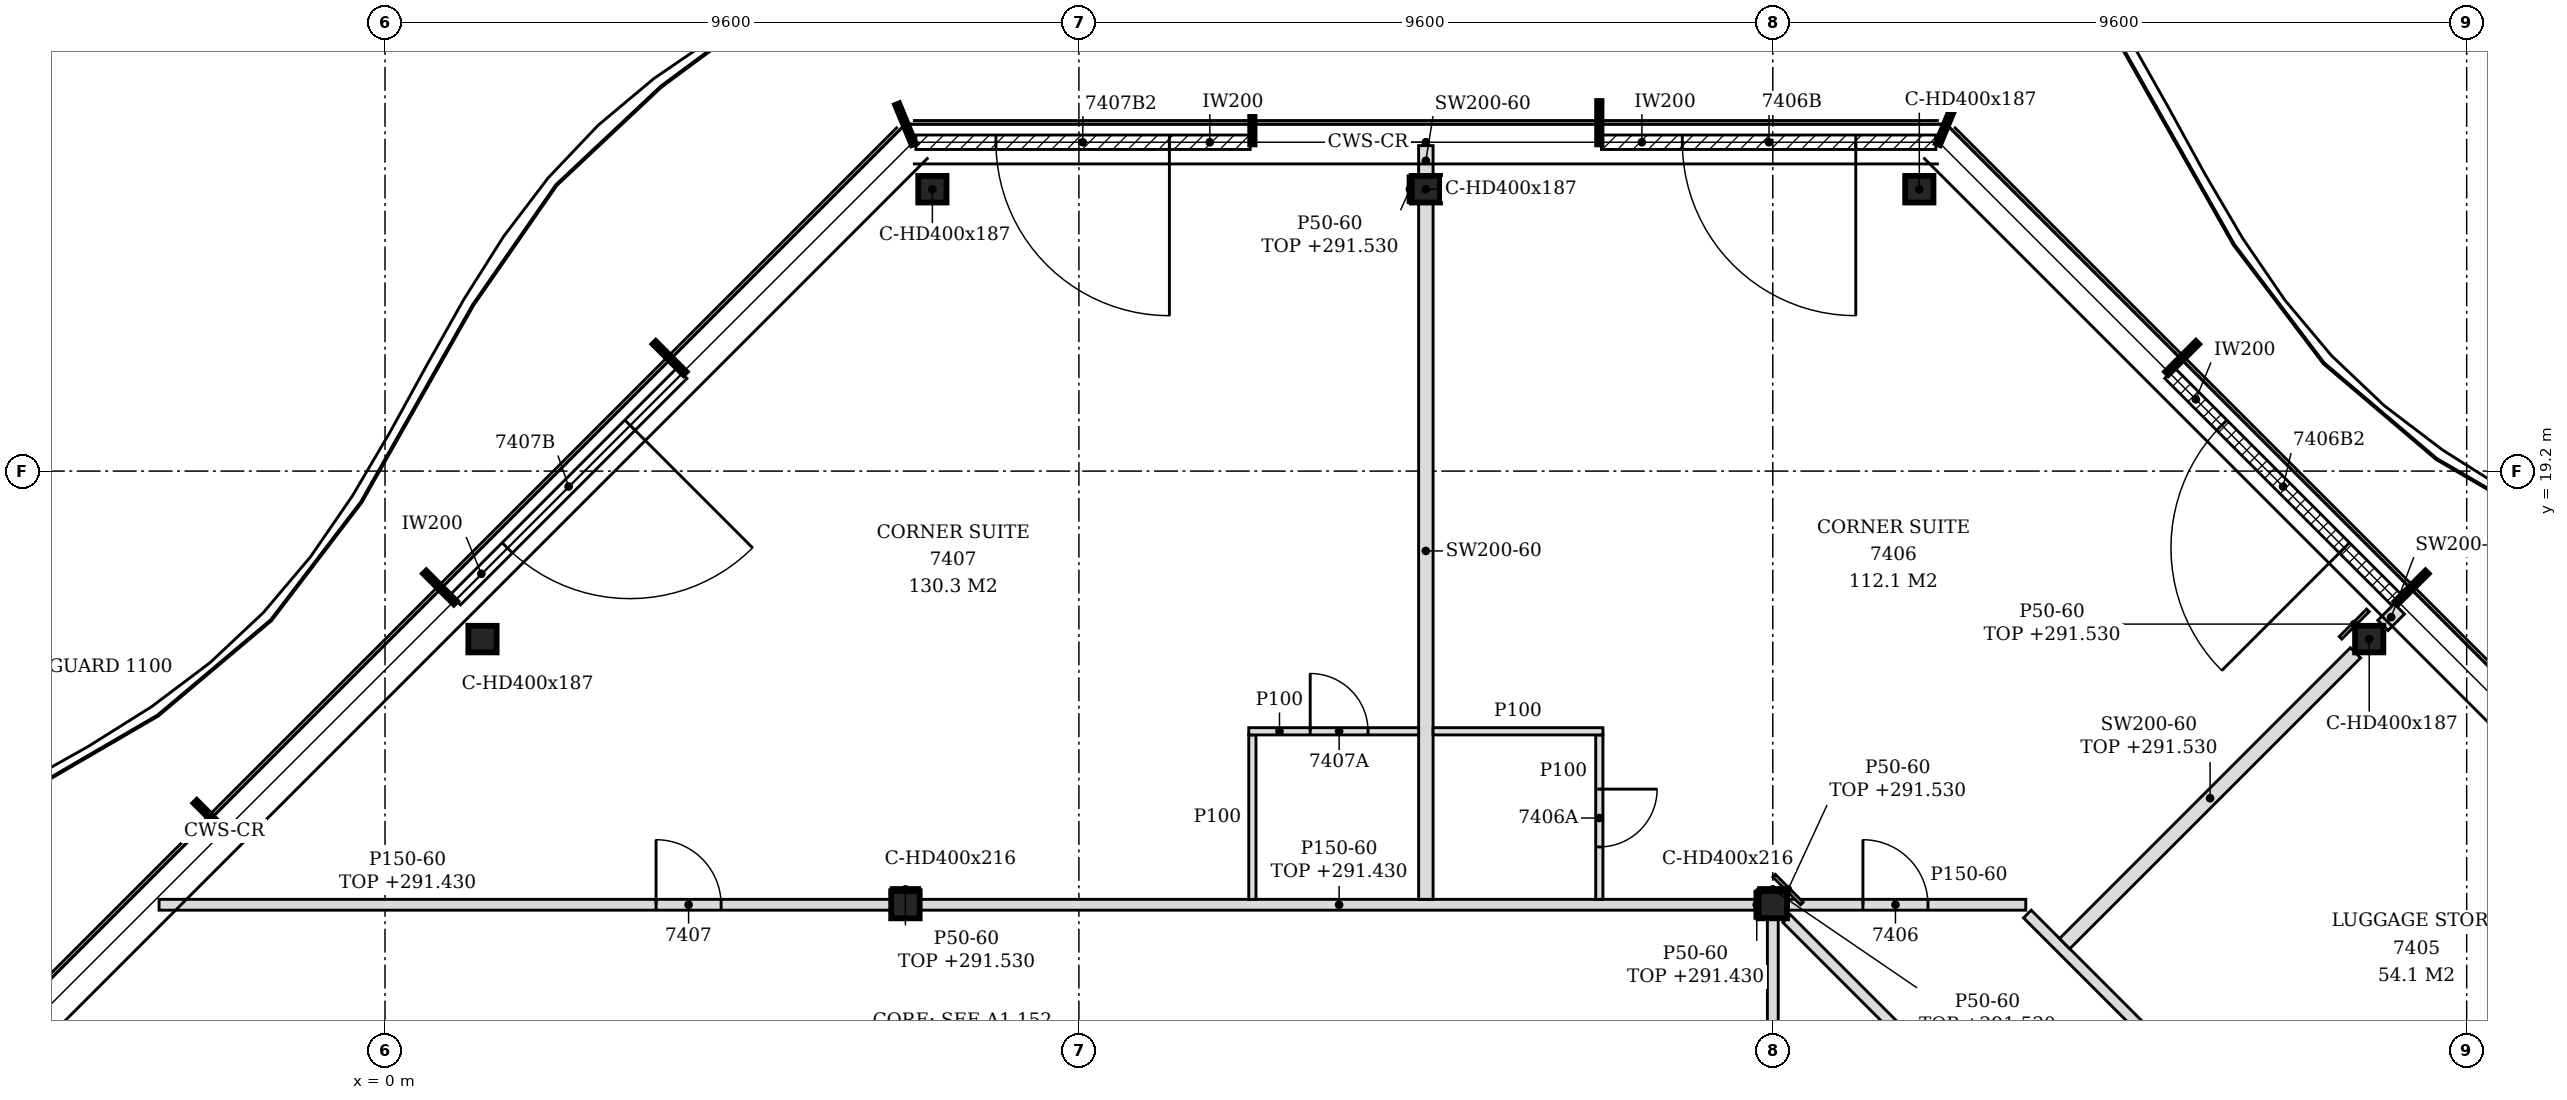
"""IFC4 building model, lengths in metres.
Left out: names, types, materials, properties, quantities, classifications, styles, units other than length and angle.
Written with IfcOpenShell. Run it as: python <this file> out.ifc"""

import sys

from ifc_helpers import new_model, si_unit, direction, frame, frame_2d, origin, origin_2d, place, context, subcontext, project, spatial, polyline, rectangle, i_section, outline, extrude, element, fill, save


model = new_model("IFC4")
c1 = context("Model", 3, precision=1e-05, world=origin(), true_north=direction((0.0, 1.0)))
c2 = subcontext(c1, "Body", "Model", "MODEL_VIEW")
j1 = project(units=[si_unit("LENGTHUNIT", "METRE"), si_unit("PLANEANGLEUNIT", "RADIAN")], contexts=[c1])
p1 = place(None, origin())
s1 = spatial("IfcSite", under=j1, at=p1, CompositionType="ELEMENT")
p2 = place(p1, origin())
s2 = spatial("IfcBuilding", under=s1, at=p2, CompositionType="ELEMENT")
p3 = place(p2, frame((0.0, 0.0, 288.6)))
s3 = spatial("IfcBuildingStorey", under=s2, at=p3, CompositionType="ELEMENT", Elevation=288.6)
for number, where, z_axis, x_axis in (
    (1, (27.451, 16.876, -0.15), (0.0, 0.0, 1.0), (1.0, 0.0, 0.0)),
    (2, (21.227, 23.1, -0.15), (0.0, 0.0, 1.0), (1.0, 0.0, 0.0)),
    (3, (14.4, 23.1, -0.15), (0.0, 0.0, 1.0), (1.0, 0.0, 0.0)),
    (4, (7.573, 23.1, -0.15), (0.0, 0.0, 1.0), (1.0, 0.0, 0.0)),
    (5, (1.348, 16.876, -0.15), (0.0, 0.0, 1.0), (1.0, 0.0, 0.0)),
):
    element("IfcColumn", number, at=place(p3, frame(where, z_axis=z_axis, x_axis=x_axis)), inside=s3, PredefinedType="COLUMN", context=c2, shape_type="SweptSolid", body=[
        extrude(i_section(OverallWidth=0.391, OverallDepth=0.368, WebThickness=0.015, FlangeThickness=0.024, FilletRadius=0.015, at=origin_2d()), origin(), (0.0, 0.0, 1.0), 3.6),
    ])
for number, where, z_axis, x_axis in (
    (6, (7.2, 13.2, -0.15), (0.0, 0.0, 1.0), (1.0, 0.0, 0.0)),
    (7, (19.2, 13.2, -0.15), (0.0, 0.0, 1.0), (1.0, 0.0, 0.0)),
):
    element("IfcColumn", number, at=place(p3, frame(where, z_axis=z_axis, x_axis=x_axis)), inside=s3, PredefinedType="COLUMN", context=c2, shape_type="SweptSolid", body=[
        extrude(i_section(OverallWidth=0.394, OverallDepth=0.375, WebThickness=0.017, FlangeThickness=0.028, FilletRadius=0.015, at=origin_2d()), origin(), (0.0, 0.0, 1.0), 3.6),
    ])
p4 = place(p3, frame((27.826, 17.42, 0.0), z_axis=(0.0, 0.0, 1.0), x_axis=(-0.707079231393, 0.707134329907, 0.0)))
e8 = element("IfcWall", 8, at=p4, inside=s3, PredefinedType="NOTDEFINED", context=c2, shape_type="SweptSolid", body=[
    extrude(rectangle(XDim=4.431, YDim=0.2, at=frame_2d((2.215, 0.0))), origin(), (0.0, 0.0, 1.0), 3.45),
])
p5 = place(p4, frame((1.015, 0.0, 0.0)))
e9 = element("IfcOpeningElement", 9, at=p5, cuts=e8, PredefinedType="OPENING", context=c2, shape_type="SweptSolid", body=[
    extrude(rectangle(XDim=2.4, YDim=2.4, at=frame_2d((1.2, 1.2))), frame((0.0, 0.11, 0.0), z_axis=(0.0, -1.0, 0.0), x_axis=(1.0, 0.0, 0.0)), (0.0, 0.0, 1.0), 0.22),
])
p6 = place(p3, frame((21.457, 23.75, 0.0), z_axis=(0.0, 0.0, 1.0), x_axis=(-1.0, 0.0, 0.0)))
e10 = element("IfcWall", 10, at=p6, inside=s3, PredefinedType="NOTDEFINED", context=c2, shape_type="SweptSolid", body=[
    extrude(rectangle(XDim=4.626, YDim=0.2, at=frame_2d((2.313, 0.0))), origin(), (0.0, 0.0, 1.0), 3.45),
])
p7 = place(p6, frame((1.108, 0.0, 0.0)))
e11 = element("IfcOpeningElement", 11, at=p7, cuts=e10, PredefinedType="OPENING", context=c2, shape_type="SweptSolid", body=[
    extrude(rectangle(XDim=2.4, YDim=2.4, at=frame_2d((1.2, 1.2))), frame((0.0, 0.11, 0.0), z_axis=(0.0, -1.0, 0.0), x_axis=(1.0, 0.0, 0.0)), (0.0, 0.0, 1.0), 0.22),
])
p8 = place(p3, frame((11.97, 23.75, 0.0), z_axis=(0.0, 0.0, 1.0), x_axis=(-1.0, 0.0, 0.0)))
e12 = element("IfcWall", 12, at=p8, inside=s3, PredefinedType="NOTDEFINED", context=c2, shape_type="SweptSolid", body=[
    extrude(rectangle(XDim=4.626, YDim=0.2, at=frame_2d((2.313, 0.0))), origin(), (0.0, 0.0, 1.0), 3.45),
])
p9 = place(p8, frame((1.118, 0.0, 0.0)))
e13 = element("IfcOpeningElement", 13, at=p9, cuts=e12, PredefinedType="OPENING", context=c2, shape_type="SweptSolid", body=[
    extrude(rectangle(XDim=2.4, YDim=2.4, at=frame_2d((1.2, 1.2))), frame((0.0, 0.11, 0.0), z_axis=(0.0, -1.0, 0.0), x_axis=(1.0, 0.0, 0.0)), (0.0, 0.0, 1.0), 0.22),
])
p10 = place(p3, frame((4.107, 20.553, 0.0), z_axis=(0.0, 0.0, 1.0), x_axis=(-0.707079231393, -0.707134329907, 0.0)))
e14 = element("IfcWall", 14, at=p10, inside=s3, PredefinedType="NOTDEFINED", context=c2, shape_type="SweptSolid", body=[
    extrude(rectangle(XDim=4.431, YDim=0.2, at=frame_2d((2.215, 0.0))), origin(), (0.0, 0.0, 1.0), 3.45),
])
p11 = place(p10, frame((1.015, 0.0, 0.0)))
e15 = element("IfcOpeningElement", 15, at=p11, cuts=e14, PredefinedType="OPENING", context=c2, shape_type="SweptSolid", body=[
    extrude(rectangle(XDim=2.4, YDim=2.4, at=frame_2d((1.2, 1.2))), frame((0.0, 0.11, 0.0), z_axis=(0.0, -1.0, 0.0), x_axis=(1.0, 0.0, 0.0)), (0.0, 0.0, 1.0), 0.22),
])
p12 = place(p3, frame((32.272, 0.128, 0.0), z_axis=(0.0, 0.0, 1.0), x_axis=(-0.707106781187, 0.707106781187, 0.0)))
e16 = element("IfcWall", 16, at=p12, inside=s3, PredefinedType="PARTITIONING", context=c2, shape_type="SweptSolid", body=[
    extrude(rectangle(XDim=18.215, YDim=0.15, at=frame_2d((9.107, 0.0))), origin(), (0.0, 0.0, 1.0), 2.88),
])
p13 = place(p12, frame((8.703, 0.0, 0.0)))
e17 = element("IfcOpeningElement", 17, at=p13, cuts=e16, PredefinedType="OPENING", context=c2, shape_type="SweptSolid", body=[
    extrude(rectangle(XDim=0.9, YDim=2.1, at=frame_2d((0.45, 1.05))), frame((0.0, 0.085, 0.0), z_axis=(0.0, -1.0, 0.0), x_axis=(1.0, 0.0, 0.0)), (0.0, 0.0, 1.0), 0.17),
])
p14 = place(p3, frame((34.672, 1.122, 0.0), z_axis=(0.0, 0.0, 1.0), x_axis=(-0.707114004264, 0.707099558035, 0.0)))
e18 = element("IfcWall", 18, at=p14, inside=s3, PredefinedType="PARTITIONING", context=c2, shape_type="SweptSolid", body=[
    extrude(rectangle(XDim=16.9, YDim=0.15, at=frame_2d((8.45, 0.0))), origin(), (0.0, 0.0, 1.0), 2.88),
])
p15 = place(p14, frame((6.654, 0.0, 0.0)))
e19 = element("IfcOpeningElement", 19, at=p15, cuts=e18, PredefinedType="OPENING", context=c2, shape_type="SweptSolid", body=[
    extrude(rectangle(XDim=0.9, YDim=2.1, at=frame_2d((0.45, 1.05))), frame((0.0, 0.085, 0.0), z_axis=(0.0, -1.0, 0.0), x_axis=(1.0, 0.0, 0.0)), (0.0, 0.0, 1.0), 0.17),
])
p16 = place(p14, frame((11.897, 0.0, 0.0)))
e20 = element("IfcOpeningElement", 20, at=p16, cuts=e18, PredefinedType="OPENING", context=c2, shape_type="SweptSolid", body=[
    extrude(rectangle(XDim=0.9, YDim=2.1, at=frame_2d((0.45, 1.05))), frame((0.0, 0.085, 0.0), z_axis=(0.0, -1.0, 0.0), x_axis=(1.0, 0.0, 0.0)), (0.0, 0.0, 1.0), 0.17),
])
p17 = place(p3, frame((19.2, 2.587, 0.0), z_axis=(0.0, 0.0, 1.0), x_axis=(0.0, 1.0, 0.0)))
e21 = element("IfcWall", 21, at=p17, inside=s3, PredefinedType="PARTITIONING", context=c2, shape_type="SweptSolid", body=[
    extrude(rectangle(XDim=10.425, YDim=0.15, at=frame_2d((5.212, 0.0))), origin(), (0.0, 0.0, 1.0), 2.83),
])
p18 = place(p3, frame((23.238, 12.662, 0.0), z_axis=(0.0, 0.0, 1.0), x_axis=(0.707106781187, 0.707106781187, 0.0)))
e22 = element("IfcWall", 22, at=p18, inside=s3, PredefinedType="PARTITIONING", context=c2, shape_type="SweptSolid", body=[
    extrude(rectangle(XDim=5.69, YDim=0.2, at=frame_2d((2.845, 0.0))), origin(), (0.0, 0.0, 1.0), 2.93),
])
p19 = place(p3, frame((-3.126, 13.2, 0.0), z_axis=(0.0, 0.0, 1.0), x_axis=(1.0, 0.0, 0.0)))
e23 = element("IfcWall", 23, at=p19, inside=s3, PredefinedType="PARTITIONING", context=c2, shape_type="SweptSolid", body=[
    extrude(outline(polyline([(0.0, 0.0), (10.129, 0.0), (10.129, 2.83), (1.369, 2.83), (1.367, 2.63), (0.229, 2.63), (0.227, 2.83), (0.0, 2.83), (0.0, 0.0)])), frame((0.0, 0.075, 0.0), z_axis=(0.0, -1.0, 0.0), x_axis=(1.0, 0.0, 0.0)), (0.0, 0.0, 1.0), 0.15),
])
p20 = place(p19, frame((6.876, 0.0, 0.0)))
e24 = element("IfcOpeningElement", 24, at=p20, cuts=e23, PredefinedType="OPENING", context=c2, shape_type="SweptSolid", body=[
    extrude(rectangle(XDim=0.9, YDim=2.1, at=frame_2d((0.45, 1.05))), frame((0.0, 0.085, 0.0), z_axis=(0.0, -1.0, 0.0), x_axis=(1.0, 0.0, 0.0)), (0.0, 0.0, 1.0), 0.17),
])
p21 = place(p3, frame((7.397, 13.2, 0.0), z_axis=(0.0, 0.0, 1.0), x_axis=(1.0, 0.0, 0.0)))
e25 = element("IfcWall", 25, at=p21, inside=s3, PredefinedType="PARTITIONING", context=c2, shape_type="SweptSolid", body=[
    extrude(rectangle(XDim=11.606, YDim=0.15, at=frame_2d((5.803, 0.0))), origin(), (0.0, 0.0, 1.0), 2.83),
])
p22 = place(p3, frame((19.397, 13.2, 0.0), z_axis=(0.0, 0.0, 1.0), x_axis=(1.0, 0.0, 0.0)))
e26 = element("IfcWall", 26, at=p22, inside=s3, PredefinedType="PARTITIONING", context=c2, shape_type="SweptSolid", body=[
    extrude(rectangle(XDim=3.303, YDim=0.15, at=frame_2d((1.652, 0.0))), origin(), (0.0, 0.0, 1.0), 3.45),
])
p23 = place(p22, frame((1.05, 0.0, 0.0)))
e27 = element("IfcOpeningElement", 27, at=p23, cuts=e26, PredefinedType="OPENING", context=c2, shape_type="SweptSolid", body=[
    extrude(rectangle(XDim=0.9, YDim=2.1, at=frame_2d((0.45, 1.05))), frame((0.0, 0.085, 0.0), z_axis=(0.0, -1.0, 0.0), x_axis=(1.0, 0.0, 0.0)), (0.0, 0.0, 1.0), 0.17),
])
p24 = place(p3, frame((12.0, 13.275, 0.0), z_axis=(0.0, 0.0, 1.0), x_axis=(0.0, 1.0, 0.0)))
e28 = element("IfcWall", 28, at=p24, inside=s3, PredefinedType="PARTITIONING", context=c2, shape_type="SweptSolid", body=[
    extrude(outline(polyline([(0.0, 0.0), (2.275, 0.0), (2.275, 3.45), (0.075, 3.45), (0.073, 2.83), (0.0, 2.83), (0.0, 0.0)])), frame((0.0, 0.05, 0.0), z_axis=(0.0, -1.0, 0.0), x_axis=(1.0, 0.0, 0.0)), (0.0, 0.0, 1.0), 0.1),
])
p25 = place(p3, frame((14.4, 13.275, 0.0), z_axis=(0.0, 0.0, 1.0), x_axis=(0.0, 1.0, 0.0)))
e29 = element("IfcWall", 29, at=p25, inside=s3, PredefinedType="PARTITIONING", context=c2, shape_type="SweptSolid", body=[
    extrude(outline(polyline([(0.0, 0.0), (9.641, 0.0), (9.641, 3.45), (6.03, 3.45), (6.028, 2.88), (5.82, 2.88), (5.818, 3.45), (0.075, 3.45), (0.073, 2.83), (0.0, 2.83), (0.0, 0.0)])), frame((0.0, 0.1, 0.0), z_axis=(0.0, -1.0, 0.0), x_axis=(1.0, 0.0, 0.0)), (0.0, 0.0, 1.0), 0.2),
])
p26 = place(p3, frame((16.8, 13.275, 0.0), z_axis=(0.0, 0.0, 1.0), x_axis=(0.0, 1.0, 0.0)))
e30 = element("IfcWall", 30, at=p26, inside=s3, PredefinedType="PARTITIONING", context=c2, shape_type="SweptSolid", body=[
    extrude(outline(polyline([(0.0, 0.0), (2.275, 0.0), (2.275, 3.45), (0.075, 3.45), (0.073, 2.83), (0.0, 2.83), (0.0, 0.0)])), frame((0.0, 0.05, 0.0), z_axis=(0.0, -1.0, 0.0), x_axis=(1.0, 0.0, 0.0)), (0.0, 0.0, 1.0), 0.1),
])
p27 = place(p26, frame((0.725, 0.0, 0.0)))
e31 = element("IfcOpeningElement", 31, at=p27, cuts=e30, PredefinedType="OPENING", context=c2, shape_type="SweptSolid", body=[
    extrude(rectangle(XDim=0.8, YDim=2.1, at=frame_2d((0.4, 1.05))), frame((0.0, 0.06, 0.0), z_axis=(0.0, -1.0, 0.0), x_axis=(1.0, 0.0, 0.0)), (0.0, 0.0, 1.0), 0.12),
])
p28 = place(p3, frame((11.95, 15.6, 0.0), z_axis=(0.0, 0.0, 1.0), x_axis=(1.0, 0.0, 0.0)))
e32 = element("IfcWall", 32, at=p28, inside=s3, PredefinedType="PARTITIONING", context=c2, shape_type="SweptSolid", body=[
    extrude(rectangle(XDim=2.35, YDim=0.1, at=frame_2d((1.175, 0.0))), origin(), (0.0, 0.0, 1.0), 3.45),
])
p29 = place(p28, frame((0.85, 0.0, 0.0)))
e33 = element("IfcOpeningElement", 33, at=p29, cuts=e32, PredefinedType="OPENING", context=c2, shape_type="SweptSolid", body=[
    extrude(rectangle(XDim=0.8, YDim=2.1, at=frame_2d((0.4, 1.05))), frame((0.0, 0.06, 0.0), z_axis=(0.0, -1.0, 0.0), x_axis=(1.0, 0.0, 0.0)), (0.0, 0.0, 1.0), 0.12),
])
p30 = place(p3, frame((14.5, 15.6, 0.0), z_axis=(0.0, 0.0, 1.0), x_axis=(1.0, 0.0, 0.0)))
e34 = element("IfcWall", 34, at=p30, inside=s3, PredefinedType="PARTITIONING", context=c2, shape_type="SweptSolid", body=[
    extrude(rectangle(XDim=2.35, YDim=0.1, at=frame_2d((1.175, 0.0))), origin(), (0.0, 0.0, 1.0), 3.45),
])
p31 = place(p3, frame((27.641, 17.065, 0.0), z_axis=(0.0, 0.0, 1.0), x_axis=(0.707106781187, 0.707106781187, 0.0)))
e35 = element("IfcWall", 35, at=p31, inside=s3, PredefinedType="PARTITIONING", context=c2, shape_type="SweptSolid", body=[
    extrude(rectangle(XDim=0.322, YDim=0.2, at=frame_2d((0.161, 0.0))), origin(), (0.0, 0.0, 1.0), 3.45),
])
p32 = place(p3, frame((14.4, 23.284, 0.0), z_axis=(0.0, 0.0, 1.0), x_axis=(0.0, 1.0, 0.0)))
e36 = element("IfcWall", 36, at=p32, inside=s3, PredefinedType="PARTITIONING", context=c2, shape_type="SweptSolid", body=[
    extrude(rectangle(XDim=0.419, YDim=0.2, at=frame_2d((0.209, 0.0))), origin(), (0.0, 0.0, 1.0), 3.45),
])
p33 = place(p3, frame((18.978, 13.012, 0.0), z_axis=(0.0, 0.0, 1.0), x_axis=(0.0, 1.0, 0.0)))
e37 = element("IfcWall", 37, at=p33, inside=s3, PredefinedType="PARTITIONING", context=c2, shape_type="SweptSolid", body=[
    extrude(rectangle(XDim=0.375, YDim=0.05, at=frame_2d((0.188, 0.0))), origin(), (0.0, 0.0, 1.0), 2.83),
])
p34 = place(p3, frame((19.602, 13.218, 0.0), z_axis=(0.0, 0.0, 1.0), x_axis=(-0.707106781187, 0.707106781187, 0.0)))
e38 = element("IfcWall", 38, at=p34, inside=s3, PredefinedType="PARTITIONING", context=c2, shape_type="SweptSolid", body=[
    extrude(rectangle(XDim=0.544, YDim=0.05, at=frame_2d((0.272, 0.0))), origin(), (0.0, 0.0, 1.0), 2.93),
])
p35 = place(p3, frame((27.054, 16.893, 0.0), z_axis=(0.0, 0.0, 1.0), x_axis=(0.707106781187, 0.707106781187, 0.0)))
e39 = element("IfcWall", 39, at=p35, inside=s3, PredefinedType="PARTITIONING", context=c2, shape_type="SweptSolid", body=[
    extrude(rectangle(XDim=0.537, YDim=0.05, at=frame_2d((0.269, 0.0))), origin(), (0.0, 0.0, 1.0), 2.93),
])
for number, where, z_axis, x_axis in (
    (40, (7.003, 13.413, 0.0), (0.0, 0.0, 1.0), (1.0, 0.0, 0.0)),
    (41, (19.003, 13.413, 0.0), (0.0, 0.0, 1.0), (1.0, 0.0, 0.0)),
):
    element("IfcWall", number, at=place(p3, frame(where, z_axis=z_axis, x_axis=x_axis)), inside=s3, PredefinedType="PARTITIONING", context=c2, shape_type="SweptSolid", body=[
        extrude(rectangle(XDim=0.394, YDim=0.05, at=frame_2d((0.197, 0.0))), origin(), (0.0, 0.0, 1.0), 2.93),
    ])
p36 = place(p3, frame((14.179, 22.916, 0.0), z_axis=(0.0, 0.0, 1.0), x_axis=(0.0, 1.0, 0.0)))
e42 = element("IfcWall", 42, at=p36, inside=s3, PredefinedType="PARTITIONING", context=c2, shape_type="SweptSolid", body=[
    extrude(rectangle(XDim=0.368, YDim=0.05, at=frame_2d((0.184, 0.0))), origin(), (0.0, 0.0, 1.0), 2.93),
])
p37 = place(p5, origin())
e43 = element("IfcDoor", 43, at=p37, inside=s3, OperationType="SINGLE_SWING_LEFT", PredefinedType="DOOR", context=c2, shape_type="SweptSolid", body=[
    extrude(rectangle(XDim=2.4, YDim=2.4, at=frame_2d((1.2, 1.2))), frame((0.0, 0.025, 0.0), z_axis=(0.0, -1.0, 0.0), x_axis=(1.0, 0.0, 0.0)), (0.0, 0.0, 1.0), 0.05),
])
fill(e9, e43)
p38 = place(p7, origin())
e44 = element("IfcDoor", 44, at=p38, inside=s3, OperationType="SINGLE_SWING_LEFT", PredefinedType="DOOR", context=c2, shape_type="SweptSolid", body=[
    extrude(rectangle(XDim=2.4, YDim=2.4, at=frame_2d((1.2, 1.2))), frame((0.0, 0.025, 0.0), z_axis=(0.0, -1.0, 0.0), x_axis=(1.0, 0.0, 0.0)), (0.0, 0.0, 1.0), 0.05),
])
fill(e11, e44)
p39 = place(p9, origin())
e45 = element("IfcDoor", 45, at=p39, inside=s3, OperationType="SINGLE_SWING_LEFT", PredefinedType="DOOR", context=c2, shape_type="SweptSolid", body=[
    extrude(rectangle(XDim=2.4, YDim=2.4, at=frame_2d((1.2, 1.2))), frame((0.0, 0.025, 0.0), z_axis=(0.0, -1.0, 0.0), x_axis=(1.0, 0.0, 0.0)), (0.0, 0.0, 1.0), 0.05),
])
fill(e13, e45)
p40 = place(p11, origin())
e46 = element("IfcDoor", 46, at=p40, inside=s3, OperationType="SINGLE_SWING_LEFT", PredefinedType="DOOR", context=c2, shape_type="SweptSolid", body=[
    extrude(rectangle(XDim=2.4, YDim=2.4, at=frame_2d((1.2, 1.2))), frame((0.0, 0.025, 0.0), z_axis=(0.0, -1.0, 0.0), x_axis=(1.0, 0.0, 0.0)), (0.0, 0.0, 1.0), 0.05),
])
fill(e15, e46)
p41 = place(p23, origin())
e47 = element("IfcDoor", 47, at=p41, inside=s3, OperationType="SINGLE_SWING_LEFT", PredefinedType="DOOR", context=c2, shape_type="SweptSolid", body=[
    extrude(rectangle(XDim=0.9, YDim=2.1, at=frame_2d((0.45, 1.05))), frame((0.0, 0.025, 0.0), z_axis=(0.0, -1.0, 0.0), x_axis=(1.0, 0.0, 0.0)), (0.0, 0.0, 1.0), 0.05),
])
fill(e27, e47)
p42 = place(p27, frame((0.8, 0.0, 0.0), z_axis=(0.0, 0.0, 1.0), x_axis=(-1.0, 0.0, 0.0)))
e48 = element("IfcDoor", 48, at=p42, inside=s3, OperationType="SINGLE_SWING_LEFT", PredefinedType="DOOR", context=c2, shape_type="SweptSolid", body=[
    extrude(rectangle(XDim=0.8, YDim=2.1, at=frame_2d((0.4, 1.05))), frame((0.0, 0.025, 0.0), z_axis=(0.0, -1.0, 0.0), x_axis=(1.0, 0.0, 0.0)), (0.0, 0.0, 1.0), 0.05),
])
fill(e31, e48)
p43 = place(p20, origin())
e49 = element("IfcDoor", 49, at=p43, inside=s3, OperationType="SINGLE_SWING_LEFT", PredefinedType="DOOR", context=c2, shape_type="SweptSolid", body=[
    extrude(rectangle(XDim=0.9, YDim=2.1, at=frame_2d((0.45, 1.05))), frame((0.0, 0.025, 0.0), z_axis=(0.0, -1.0, 0.0), x_axis=(1.0, 0.0, 0.0)), (0.0, 0.0, 1.0), 0.05),
])
fill(e24, e49)
p44 = place(p29, origin())
e50 = element("IfcDoor", 50, at=p44, inside=s3, OperationType="SINGLE_SWING_LEFT", PredefinedType="DOOR", context=c2, shape_type="SweptSolid", body=[
    extrude(rectangle(XDim=0.8, YDim=2.1, at=frame_2d((0.4, 1.05))), frame((0.0, 0.025, 0.0), z_axis=(0.0, -1.0, 0.0), x_axis=(1.0, 0.0, 0.0)), (0.0, 0.0, 1.0), 0.05),
])
fill(e33, e50)
save(model, sys.argv[1])
